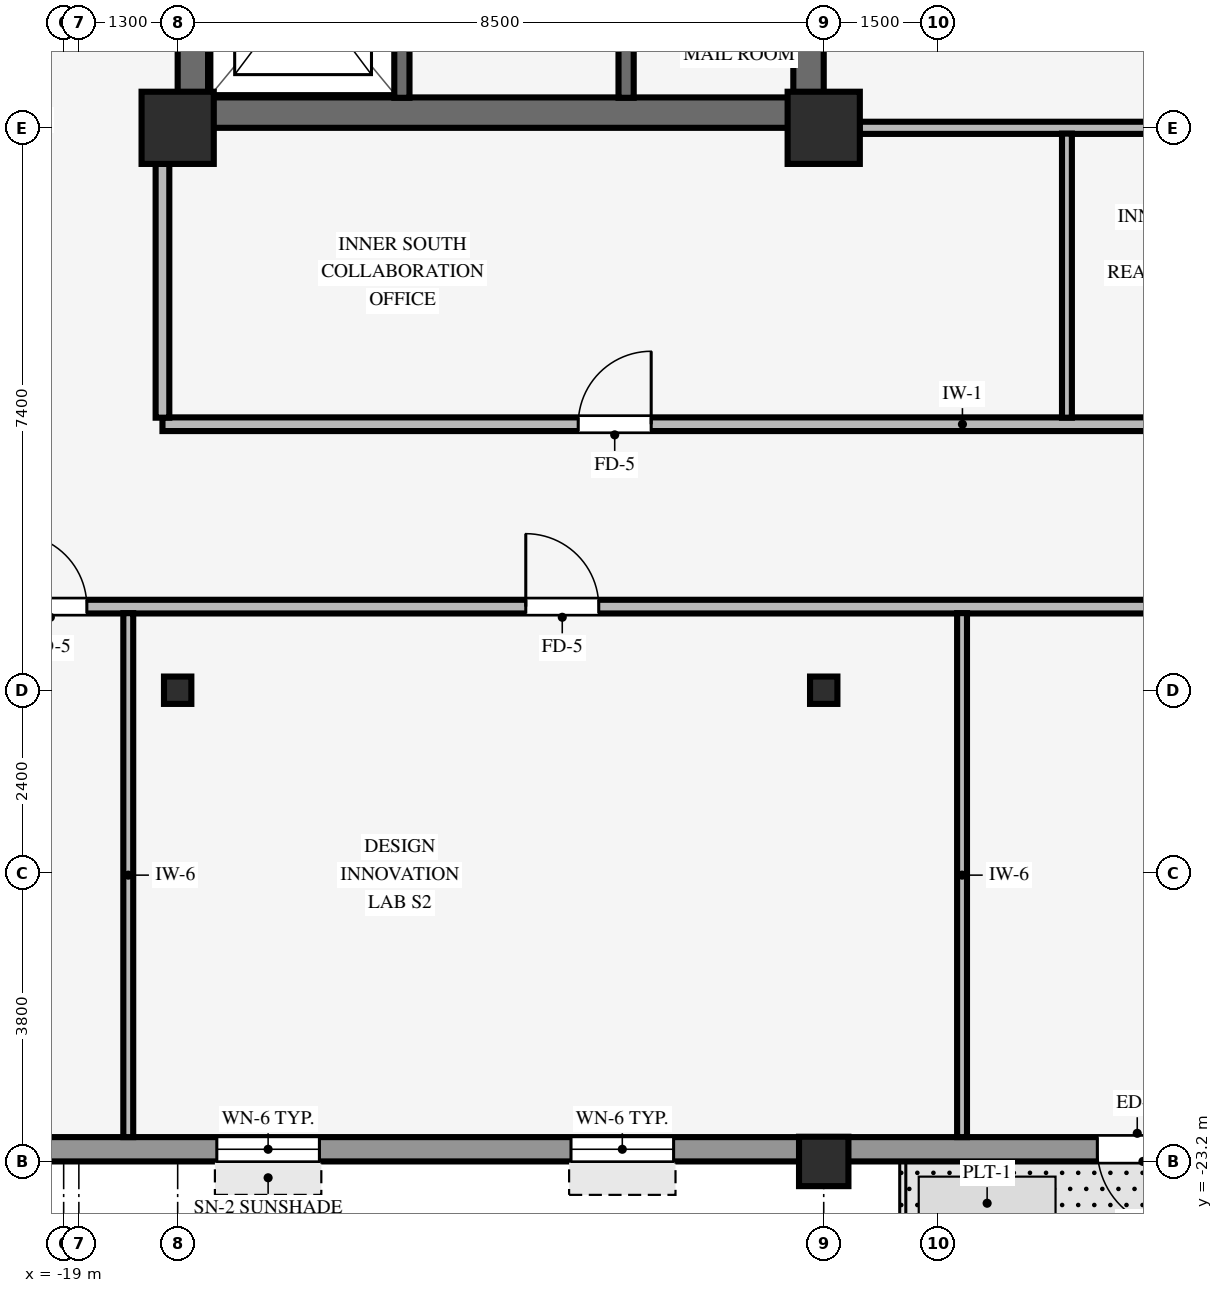
"""IFC4 building model, lengths in metres.
Left out: names, types, materials, properties, quantities, classifications, styles, units other than length and angle.
Written with IfcOpenShell. Run it as: python <this file> out.ifc"""

import sys

from ifc_helpers import new_model, si_unit, direction, frame, frame_2d, origin, origin_2d, place, context, subcontext, project, spatial, rectangle, hollow_rectangle, i_section, extrude, source, transform, mapped, element, fill, save


model = new_model("IFC4")
c1 = context("Model", 3, precision=1e-05, world=origin(), true_north=direction((0.0, 1.0)))
c2 = subcontext(c1, "Body", "Model", "MODEL_VIEW")
j1 = project(units=[si_unit("LENGTHUNIT", "METRE"), si_unit("PLANEANGLEUNIT", "RADIAN")], contexts=[c1])
p1 = place(None, origin())
s1 = spatial("IfcSite", under=j1, at=p1, CompositionType="ELEMENT")
p2 = place(p1, origin())
s2 = spatial("IfcBuilding", under=s1, at=p2, CompositionType="ELEMENT")
p3 = place(p2, frame((0.0, 0.0, 156.7)))
s3 = spatial("IfcBuildingStorey", under=s2, at=p3, CompositionType="ELEMENT", Elevation=156.7)
p4 = place(p3, frame((-17.5, -9.4, 0.0), z_axis=(0.0, 0.0, 1.0), x_axis=(1.0, 0.0, 0.0)))
e1 = element("IfcWall", 1, at=p4, inside=s3, PredefinedType="SHEAR", context=c2, shape_type="SweptSolid", body=[
    extrude(rectangle(XDim=8.5, YDim=0.4, at=frame_2d((4.25, 0.0))), origin(), (0.0, 0.0, 1.0), 3.37),
])
p5 = place(p3, frame((-17.3, -9.205, 0.0), z_axis=(0.0, 0.0, 1.0), x_axis=(0.0, 1.0, 0.0)))
e2 = element("IfcWall", 2, at=p5, inside=s3, PredefinedType="SHEAR", context=c2, shape_type="SweptSolid", body=[
    extrude(rectangle(XDim=18.41, YDim=0.4, at=frame_2d((9.205, 0.0))), origin(), (0.0, 0.0, 1.0), 3.37),
])
p6 = place(p3, frame((-9.2, -9.205, 0.0), z_axis=(0.0, 0.0, 1.0), x_axis=(0.0, 1.0, 0.0)))
e3 = element("IfcWall", 3, at=p6, inside=s3, PredefinedType="SHEAR", context=c2, shape_type="SweptSolid", body=[
    extrude(rectangle(XDim=18.41, YDim=0.4, at=frame_2d((9.205, 0.0))), origin(), (0.0, 0.0, 1.0), 3.37),
])
p7 = place(p6, frame((8.605, 0.0, 0.0)))
e4 = element("IfcOpeningElement", 4, at=p7, cuts=e3, PredefinedType="OPENING", context=c2, shape_type="SweptSolid", body=[
    extrude(rectangle(XDim=1.2, YDim=2.15, at=frame_2d((0.6, 1.075))), frame((0.0, 0.21, 0.0), z_axis=(0.0, -1.0, 0.0), x_axis=(1.0, 0.0, 0.0)), (0.0, 0.0, 1.0), 0.42),
])
for number, where, z_axis, x_axis in (
    (5, (-17.5, -9.6, 0.0), (0.0, 0.0, 1.0), (1.0, 0.0, 0.0)),
    (6, (-9.0, -9.6, 0.0), (0.0, 0.0, 1.0), (1.0, 0.0, 0.0)),
):
    element("IfcColumn", number, at=place(p3, frame(where, z_axis=z_axis, x_axis=x_axis)), inside=s3, PredefinedType="COLUMN", context=c2, shape_type="SweptSolid", body=[
        extrude(rectangle(XDim=0.95, YDim=0.95, at=origin_2d()), origin(), (0.0, 0.0, 1.0), 3.37),
    ])
p8 = place(p3, frame((-9.0, -23.2, 0.0), z_axis=(0.0, 0.0, 1.0), x_axis=(1.0, 0.0, 0.0)))
e7 = element("IfcColumn", 7, at=p8, inside=s3, PredefinedType="COLUMN", context=c2, shape_type="SweptSolid", body=[
    extrude(hollow_rectangle(XDim=0.65, YDim=0.65, WallThickness=0.04, InnerFilletRadius=0.04, OuterFilletRadius=0.08, at=origin_2d()), origin(), (0.0, 0.0, 1.0), 3.37),
])
for number, where, z_axis, x_axis in (
    (8, (-17.5, -17.0, 0.0), (0.0, 0.0, 1.0), (1.0, 0.0, 0.0)),
    (9, (-9.0, -17.0, 0.0), (0.0, 0.0, 1.0), (1.0, 0.0, 0.0)),
):
    element("IfcColumn", number, at=place(p3, frame(where, z_axis=z_axis, x_axis=x_axis)), inside=s3, PredefinedType="COLUMN", context=c2, shape_type="SweptSolid", body=[
        extrude(i_section(OverallWidth=0.36, OverallDepth=0.36, WebThickness=0.021, FlangeThickness=0.021, FilletRadius=0.018, at=origin_2d()), origin(), (0.0, 0.0, 1.0), 3.37),
    ])
p9 = place(p3, frame((-24.3, -23.04, 0.0), z_axis=(0.0, 0.0, 1.0), x_axis=(1.0, 0.0, 0.0)))
e10 = element("IfcWall", 10, at=p9, inside=s3, PredefinedType="STANDARD", context=c2, shape_type="SweptSolid", body=[
    extrude(rectangle(XDim=48.6, YDim=0.32, at=frame_2d((24.3, 0.0))), origin(), (0.0, 0.0, 1.0), 2.705),
])
p10 = place(p9, frame((19.95, 0.0, 0.0), z_axis=(0.0, 0.0, 1.0), x_axis=(-1.0, 0.0, 0.0)))
e11 = element("IfcOpeningElement", 11, at=p10, cuts=e10, PredefinedType="OPENING", context=c2, shape_type="SweptSolid", body=[
    extrude(rectangle(XDim=1.05, YDim=2.1, at=frame_2d((0.525, 1.05))), frame((0.0, 0.17, 0.0), z_axis=(0.0, -1.0, 0.0), x_axis=(1.0, 0.0, 0.0)), (0.0, 0.0, 1.0), 0.34),
])
p11 = place(p9, frame((2.655, 0.0, 0.8)))
e12 = element("IfcOpeningElement", 12, at=p11, cuts=e10, PredefinedType="OPENING", context=c2, shape_type="SweptSolid", body=[
    extrude(rectangle(XDim=1.35, YDim=1.56, at=frame_2d((0.675, 0.78))), frame((0.0, 0.17, 0.0), z_axis=(0.0, -1.0, 0.0), x_axis=(1.0, 0.0, 0.0)), (0.0, 0.0, 1.0), 0.34),
])
p12 = place(p9, frame((7.315, 0.0, 0.8)))
e13 = element("IfcOpeningElement", 13, at=p12, cuts=e10, PredefinedType="OPENING", context=c2, shape_type="SweptSolid", body=[
    extrude(rectangle(XDim=1.35, YDim=1.56, at=frame_2d((0.675, 0.78))), frame((0.0, 0.17, 0.0), z_axis=(0.0, -1.0, 0.0), x_axis=(1.0, 0.0, 0.0)), (0.0, 0.0, 1.0), 0.34),
])
p13 = place(p9, frame((11.975, 0.0, 0.8)))
e14 = element("IfcOpeningElement", 14, at=p13, cuts=e10, PredefinedType="OPENING", context=c2, shape_type="SweptSolid", body=[
    extrude(rectangle(XDim=1.35, YDim=1.56, at=frame_2d((0.675, 0.78))), frame((0.0, 0.17, 0.0), z_axis=(0.0, -1.0, 0.0), x_axis=(1.0, 0.0, 0.0)), (0.0, 0.0, 1.0), 0.34),
])
p14 = place(p9, frame((21.295, 0.0, 0.8)))
e15 = element("IfcOpeningElement", 15, at=p14, cuts=e10, PredefinedType="OPENING", context=c2, shape_type="SweptSolid", body=[
    extrude(rectangle(XDim=1.35, YDim=1.56, at=frame_2d((0.675, 0.78))), frame((0.0, 0.17, 0.0), z_axis=(0.0, -1.0, 0.0), x_axis=(1.0, 0.0, 0.0)), (0.0, 0.0, 1.0), 0.34),
])
p15 = place(p9, frame((25.955, 0.0, 0.8)))
e16 = element("IfcOpeningElement", 16, at=p15, cuts=e10, PredefinedType="OPENING", context=c2, shape_type="SweptSolid", body=[
    extrude(rectangle(XDim=1.35, YDim=1.56, at=frame_2d((0.675, 0.78))), frame((0.0, 0.17, 0.0), z_axis=(0.0, -1.0, 0.0), x_axis=(1.0, 0.0, 0.0)), (0.0, 0.0, 1.0), 0.34),
])
p16 = place(p9, frame((31.065, 0.0, 0.8)))
e17 = element("IfcOpeningElement", 17, at=p16, cuts=e10, PredefinedType="OPENING", context=c2, shape_type="SweptSolid", body=[
    extrude(rectangle(XDim=1.35, YDim=1.56, at=frame_2d((0.675, 0.78))), frame((0.0, 0.17, 0.0), z_axis=(0.0, -1.0, 0.0), x_axis=(1.0, 0.0, 0.0)), (0.0, 0.0, 1.0), 0.34),
])
p17 = place(p9, frame((35.275, 0.0, 0.8)))
e18 = element("IfcOpeningElement", 18, at=p17, cuts=e10, PredefinedType="OPENING", context=c2, shape_type="SweptSolid", body=[
    extrude(rectangle(XDim=1.35, YDim=1.56, at=frame_2d((0.675, 0.78))), frame((0.0, 0.17, 0.0), z_axis=(0.0, -1.0, 0.0), x_axis=(1.0, 0.0, 0.0)), (0.0, 0.0, 1.0), 0.34),
])
p18 = place(p9, frame((39.935, 0.0, 0.8)))
e19 = element("IfcOpeningElement", 19, at=p18, cuts=e10, PredefinedType="OPENING", context=c2, shape_type="SweptSolid", body=[
    extrude(rectangle(XDim=1.35, YDim=1.56, at=frame_2d((0.675, 0.78))), frame((0.0, 0.17, 0.0), z_axis=(0.0, -1.0, 0.0), x_axis=(1.0, 0.0, 0.0)), (0.0, 0.0, 1.0), 0.34),
])
p19 = place(p9, frame((44.595, 0.0, 0.8)))
e20 = element("IfcOpeningElement", 20, at=p19, cuts=e10, PredefinedType="OPENING", context=c2, shape_type="SweptSolid", body=[
    extrude(rectangle(XDim=1.35, YDim=1.56, at=frame_2d((0.675, 0.78))), frame((0.0, 0.17, 0.0), z_axis=(0.0, -1.0, 0.0), x_axis=(1.0, 0.0, 0.0)), (0.0, 0.0, 1.0), 0.34),
])
p20 = place(p3, frame((-14.55, -9.205, 0.0), z_axis=(0.0, 0.0, 1.0), x_axis=(0.0, 1.0, 0.0)))
e21 = element("IfcWall", 21, at=p20, inside=s3, PredefinedType="SHEAR", context=c2, shape_type="SweptSolid", body=[
    extrude(rectangle(XDim=3.01, YDim=0.2, at=frame_2d((1.505, 0.0))), origin(), (0.0, 0.0, 1.0), 3.37),
])
p21 = place(p20, frame((0.93, 0.0, 0.0)))
e22 = element("IfcOpeningElement", 22, at=p21, cuts=e21, PredefinedType="OPENING", context=c2, shape_type="SweptSolid", body=[
    extrude(rectangle(XDim=1.15, YDim=2.15, at=frame_2d((0.575, 1.075))), frame((0.0, 0.11, 0.0), z_axis=(0.0, -1.0, 0.0), x_axis=(1.0, 0.0, 0.0)), (0.0, 0.0, 1.0), 0.22),
])
p22 = place(p3, frame((-11.6, -9.205, 0.0), z_axis=(0.0, 0.0, 1.0), x_axis=(0.0, 1.0, 0.0)))
e23 = element("IfcWall", 23, at=p22, inside=s3, PredefinedType="SHEAR", context=c2, shape_type="SweptSolid", body=[
    extrude(rectangle(XDim=7.975, YDim=0.2, at=frame_2d((3.988, 0.0))), origin(), (0.0, 0.0, 1.0), 3.37),
])
p23 = place(p22, frame((1.265, 0.0, 0.0)))
e24 = element("IfcOpeningElement", 24, at=p23, cuts=e23, PredefinedType="OPENING", context=c2, shape_type="SweptSolid", body=[
    extrude(rectangle(XDim=0.88, YDim=2.1, at=frame_2d((0.44, 1.05))), frame((0.0, 0.11, 0.0), z_axis=(0.0, -1.0, 0.0), x_axis=(1.0, 0.0, 0.0)), (0.0, 0.0, 1.0), 0.22),
])
p24 = place(p22, frame((5.565, 0.0, 0.0)))
e25 = element("IfcOpeningElement", 25, at=p24, cuts=e23, PredefinedType="OPENING", context=c2, shape_type="SweptSolid", body=[
    extrude(rectangle(XDim=0.88, YDim=2.1, at=frame_2d((0.44, 1.05))), frame((0.0, 0.11, 0.0), z_axis=(0.0, -1.0, 0.0), x_axis=(1.0, 0.0, 0.0)), (0.0, 0.0, 1.0), 0.22),
])
p25 = place(p3, frame((-26.08, -15.9, 0.0), z_axis=(0.0, 0.0, 1.0), x_axis=(1.0, 0.0, 0.0)))
e26 = element("IfcWall", 26, at=p25, inside=s3, PredefinedType="PARTITIONING", context=c2, shape_type="SweptSolid", body=[
    extrude(rectangle(XDim=52.16, YDim=0.18, at=frame_2d((26.08, 0.0))), origin(), (0.0, 0.0, 1.0), 3.36),
])
p26 = place(p25, frame((24.5, 0.0, 0.0)))
e27 = element("IfcOpeningElement", 27, at=p26, cuts=e26, PredefinedType="OPENING", context=c2, shape_type="SweptSolid", body=[
    extrude(rectangle(XDim=0.96, YDim=2.1, at=frame_2d((0.48, 1.05))), frame((0.0, 0.1, 0.0), z_axis=(0.0, -1.0, 0.0), x_axis=(1.0, 0.0, 0.0)), (0.0, 0.0, 1.0), 0.2),
])
p27 = place(p25, frame((40.5, 0.0, 0.0)))
e28 = element("IfcOpeningElement", 28, at=p27, cuts=e26, PredefinedType="OPENING", context=c2, shape_type="SweptSolid", body=[
    extrude(rectangle(XDim=0.96, YDim=2.1, at=frame_2d((0.48, 1.05))), frame((0.0, 0.1, 0.0), z_axis=(0.0, -1.0, 0.0), x_axis=(1.0, 0.0, 0.0)), (0.0, 0.0, 1.0), 0.2),
])
p28 = place(p25, frame((13.16, 0.0, 0.0)))
e29 = element("IfcOpeningElement", 29, at=p28, cuts=e26, PredefinedType="OPENING", context=c2, shape_type="SweptSolid", body=[
    extrude(rectangle(XDim=0.96, YDim=2.1, at=frame_2d((0.48, 1.05))), frame((0.0, 0.1, 0.0), z_axis=(0.0, -1.0, 0.0), x_axis=(1.0, 0.0, 0.0)), (0.0, 0.0, 1.0), 0.2),
])
p29 = place(p25, frame((6.425, 0.0, 0.0)))
e30 = element("IfcOpeningElement", 30, at=p29, cuts=e26, PredefinedType="OPENING", context=c2, shape_type="SweptSolid", body=[
    extrude(rectangle(XDim=0.96, YDim=2.1, at=frame_2d((0.48, 1.05))), frame((0.0, 0.1, 0.0), z_axis=(0.0, -1.0, 0.0), x_axis=(1.0, 0.0, 0.0)), (0.0, 0.0, 1.0), 0.2),
])
p30 = place(p3, frame((-17.7, -13.5, 0.0), z_axis=(0.0, 0.0, 1.0), x_axis=(1.0, 0.0, 0.0)))
e31 = element("IfcWall", 31, at=p30, inside=s3, PredefinedType="PARTITIONING", context=c2, shape_type="SweptSolid", body=[
    extrude(rectangle(XDim=24.3, YDim=0.18, at=frame_2d((12.15, 0.0))), origin(), (0.0, 0.0, 1.0), 2.998),
])
p31 = place(p30, frame((5.47, 0.0, 0.0)))
e32 = element("IfcOpeningElement", 32, at=p31, cuts=e31, PredefinedType="OPENING", context=c2, shape_type="SweptSolid", body=[
    extrude(rectangle(XDim=0.96, YDim=2.1, at=frame_2d((0.48, 1.05))), frame((0.0, 0.1, 0.0), z_axis=(0.0, -1.0, 0.0), x_axis=(1.0, 0.0, 0.0)), (0.0, 0.0, 1.0), 0.2),
])
p32 = place(p30, frame((14.62, 0.0, 0.0)))
e33 = element("IfcOpeningElement", 33, at=p32, cuts=e31, PredefinedType="OPENING", context=c2, shape_type="SweptSolid", body=[
    extrude(rectangle(XDim=0.96, YDim=2.1, at=frame_2d((0.48, 1.05))), frame((0.0, 0.1, 0.0), z_axis=(0.0, -1.0, 0.0), x_axis=(1.0, 0.0, 0.0)), (0.0, 0.0, 1.0), 0.2),
])
p33 = place(p30, frame((18.9, 0.0, 0.0)))
e34 = element("IfcOpeningElement", 34, at=p33, cuts=e31, PredefinedType="OPENING", context=c2, shape_type="SweptSolid", body=[
    extrude(rectangle(XDim=0.9, YDim=2.1, at=frame_2d((0.45, 1.05))), frame((0.0, 0.1, 0.0), z_axis=(0.0, -1.0, 0.0), x_axis=(1.0, 0.0, 0.0)), (0.0, 0.0, 1.0), 0.2),
])
p34 = place(p30, frame((21.0, 0.0, 0.0)))
e35 = element("IfcOpeningElement", 35, at=p34, cuts=e31, PredefinedType="OPENING", context=c2, shape_type="SweptSolid", body=[
    extrude(rectangle(XDim=0.9, YDim=2.1, at=frame_2d((0.45, 1.05))), frame((0.0, 0.1, 0.0), z_axis=(0.0, -1.0, 0.0), x_axis=(1.0, 0.0, 0.0)), (0.0, 0.0, 1.0), 0.2),
])
p35 = place(p3, frame((-8.529, -9.6, 0.0), z_axis=(0.0, 0.0, 1.0), x_axis=(1.0, 0.0, 0.0)))
e36 = element("IfcWall", 36, at=p35, inside=s3, PredefinedType="PARTITIONING", context=c2, shape_type="SweptSolid", body=[
    extrude(rectangle(XDim=8.353, YDim=0.16, at=frame_2d((4.177, 0.0))), origin(), (0.0, 0.0, 1.0), 2.405),
])
p36 = place(p3, frame((-18.15, -22.88, 0.0), z_axis=(0.0, 0.0, 1.0), x_axis=(0.0, 1.0, 0.0)))
e37 = element("IfcWall", 37, at=p36, inside=s3, PredefinedType="PARTITIONING", context=c2, shape_type="SweptSolid", body=[
    extrude(rectangle(XDim=6.894, YDim=0.13, at=frame_2d((3.447, 0.0))), origin(), (0.0, 0.0, 1.0), 3.36),
])
p37 = place(p3, frame((-17.7, -13.414, 0.0), z_axis=(0.0, 0.0, 1.0), x_axis=(0.0, 1.0, 0.0)))
e38 = element("IfcWall", 38, at=p37, inside=s3, PredefinedType="PARTITIONING", context=c2, shape_type="SweptSolid", body=[
    extrude(rectangle(XDim=3.343, YDim=0.18, at=frame_2d((1.671, 0.0))), origin(), (0.0, 0.0, 1.0), 2.816),
])
p38 = place(p3, frame((-7.18, -22.88, 0.0), z_axis=(0.0, 0.0, 1.0), x_axis=(0.0, 1.0, 0.0)))
e39 = element("IfcWall", 39, at=p38, inside=s3, PredefinedType="PARTITIONING", context=c2, shape_type="SweptSolid", body=[
    extrude(rectangle(XDim=6.894, YDim=0.13, at=frame_2d((3.447, 0.0))), origin(), (0.0, 0.0, 1.0), 3.36),
])
p39 = place(p3, frame((-5.8, -13.414, 0.0), z_axis=(0.0, 0.0, 1.0), x_axis=(0.0, 1.0, 0.0)))
e40 = element("IfcWall", 40, at=p39, inside=s3, PredefinedType="PARTITIONING", context=c2, shape_type="SweptSolid", body=[
    extrude(rectangle(XDim=3.738, YDim=0.13, at=frame_2d((1.869, 0.0))), origin(), (0.0, 0.0, 1.0), 3.36),
])
m1 = source(origin(), c2, "Body", "SweptSolid", [
    extrude(rectangle(XDim=1.05, YDim=2.1, at=frame_2d((0.525, 1.05))), frame((0.0, 0.025, 0.0), z_axis=(0.0, -1.0, 0.0), x_axis=(1.0, 0.0, 0.0)), (0.0, 0.0, 1.0), 0.05),
])
p40 = place(p10, origin())
e41 = element("IfcDoor", 41, at=p40, inside=s3, OperationType="SINGLE_SWING_LEFT", PredefinedType="DOOR", context=c2, shape_type="MappedRepresentation", body=[
    mapped(m1, transform((0.0, 0.0, 0.0), scale=1.0)),
])
fill(e11, e41)
m2 = source(origin(), c2, "Body", "SweptSolid", [
    extrude(rectangle(XDim=1.35, YDim=1.56, at=frame_2d((0.675, 0.78))), frame((0.0, 0.03, 0.0), z_axis=(0.0, -1.0, 0.0), x_axis=(1.0, 0.0, 0.0)), (0.0, 0.0, 1.0), 0.06),
])
p41 = place(p12, origin())
e42 = element("IfcWindow", 42, at=p41, inside=s3, PartitioningType="SINGLE_PANEL", PredefinedType="WINDOW", context=c2, shape_type="MappedRepresentation", body=[
    mapped(m2, transform((0.0, 0.0, 0.0), scale=1.0)),
])
fill(e13, e42)
p42 = place(p13, origin())
e43 = element("IfcWindow", 43, at=p42, inside=s3, PartitioningType="SINGLE_PANEL", PredefinedType="WINDOW", context=c2, shape_type="MappedRepresentation", body=[
    mapped(m2, transform((0.0, 0.0, 0.0), scale=1.0)),
])
fill(e14, e43)
m3 = source(origin(), c2, "Body", "SweptSolid", [
    extrude(rectangle(XDim=0.96, YDim=2.1, at=frame_2d((0.48, 1.05))), frame((0.0, 0.025, 0.0), z_axis=(0.0, -1.0, 0.0), x_axis=(1.0, 0.0, 0.0)), (0.0, 0.0, 1.0), 0.05),
])
p43 = place(p31, origin())
e44 = element("IfcDoor", 44, at=p43, inside=s3, OperationType="SINGLE_SWING_RIGHT", PredefinedType="DOOR", context=c2, shape_type="MappedRepresentation", body=[
    mapped(m3, transform((0.0, 0.0, 0.0), scale=1.0)),
])
fill(e32, e44)
p44 = place(p28, origin())
e45 = element("IfcDoor", 45, at=p44, inside=s3, OperationType="SINGLE_SWING_LEFT", PredefinedType="DOOR", context=c2, shape_type="MappedRepresentation", body=[
    mapped(m3, transform((0.0, 0.0, 0.0), scale=1.0)),
])
fill(e29, e45)
p45 = place(p29, origin())
e46 = element("IfcDoor", 46, at=p45, inside=s3, OperationType="SINGLE_SWING_LEFT", PredefinedType="DOOR", context=c2, shape_type="MappedRepresentation", body=[
    mapped(m3, transform((0.0, 0.0, 0.0), scale=1.0)),
])
fill(e30, e46)
save(model, sys.argv[1])
